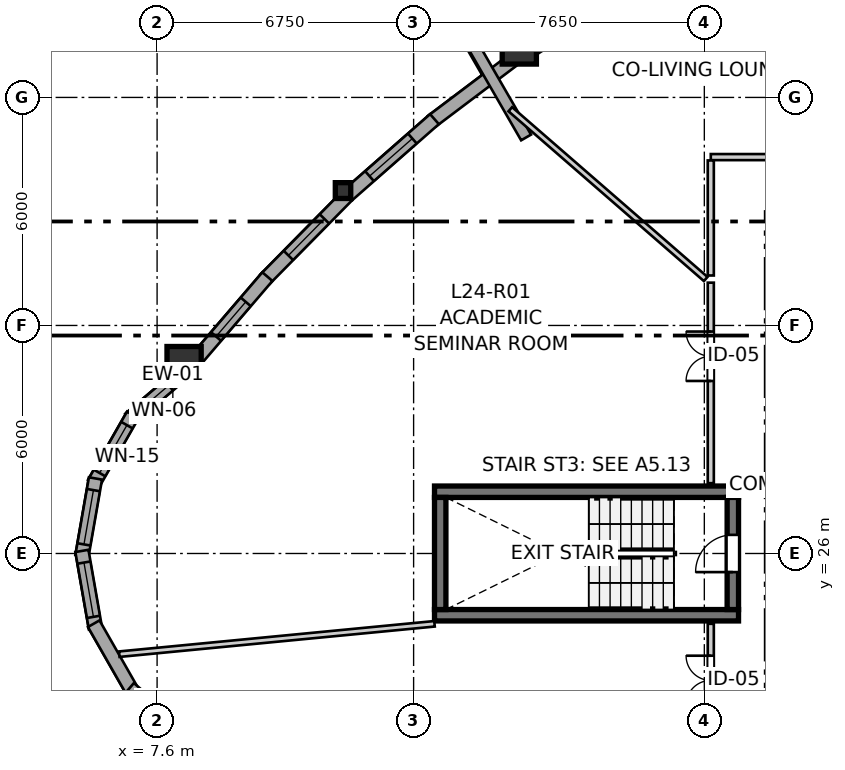
"""IFC4 building model, lengths in metres.
Left out: names, types, materials, properties, quantities, classifications, styles, units other than length and angle.
Written with IfcOpenShell. Run it as: python <this file> out.ifc"""

import sys

from ifc_helpers import new_model, si_unit, direction, frame, frame_2d, origin, origin_2d, place, context, subcontext, project, spatial, rectangle, i_section, extrude, source, transform, mapped, element, fill, save


model = new_model("IFC4")
c1 = context("Model", 3, precision=1e-05, world=origin(), true_north=direction((0.0, 1.0)))
c2 = subcontext(c1, "Body", "Model", "MODEL_VIEW")
j1 = project(units=[si_unit("LENGTHUNIT", "METRE"), si_unit("PLANEANGLEUNIT", "RADIAN")], contexts=[c1])
p1 = place(None, origin())
s1 = spatial("IfcSite", under=j1, at=p1, CompositionType="ELEMENT")
p2 = place(p1, origin())
s2 = spatial("IfcBuilding", under=s1, at=p2, CompositionType="ELEMENT")
p3 = place(p2, frame((0.0, 0.0, 83.2)))
s3 = spatial("IfcBuildingStorey", under=s2, at=p3, CompositionType="ELEMENT", Elevation=83.2)
for number, where, z_axis, x_axis in (
    (1, (14.9, 24.375, 0.0), (0.0, 0.0, 1.0), (1.0, 0.0, 0.0)),
    (2, (22.9, 27.625, 0.0), (0.0, 0.0, 1.0), (-1.0, 0.0, 0.0)),
):
    element("IfcWall", number, at=place(p3, frame(where, z_axis=z_axis, x_axis=x_axis)), inside=s3, PredefinedType="SHEAR", context=c2, shape_type="SweptSolid", body=[
        extrude(rectangle(XDim=8.0, YDim=0.3, at=frame_2d((4.0, 0.0))), origin(), (0.0, 0.0, 1.0), 2.935),
    ])
p4 = place(p3, frame((15.05, 27.475, 0.0), z_axis=(0.0, 0.0, 1.0), x_axis=(0.0, -1.0, 0.0)))
e3 = element("IfcWall", 3, at=p4, inside=s3, PredefinedType="SHEAR", context=c2, shape_type="SweptSolid", body=[
    extrude(rectangle(XDim=2.95, YDim=0.3, at=frame_2d((1.475, 0.0))), origin(), (0.0, 0.0, 1.0), 2.935),
])
p5 = place(p3, frame((22.75, 24.525, 0.0), z_axis=(0.0, 0.0, 1.0), x_axis=(0.0, 1.0, 0.0)))
e4 = element("IfcWall", 4, at=p5, inside=s3, PredefinedType="SHEAR", context=c2, shape_type="SweptSolid", body=[
    extrude(rectangle(XDim=2.95, YDim=0.3, at=frame_2d((1.475, 0.0))), origin(), (0.0, 0.0, 1.0), 2.935),
])
p6 = place(p5, frame((0.985, 0.0, 0.0)))
e5 = element("IfcOpeningElement", 5, at=p6, cuts=e4, PredefinedType="OPENING", context=c2, shape_type="SweptSolid", body=[
    extrude(rectangle(XDim=0.98, YDim=2.15, at=frame_2d((0.49, 1.075))), frame((0.0, 0.16, 0.0), z_axis=(0.0, -1.0, 0.0), x_axis=(1.0, 0.0, 0.0)), (0.0, 0.0, 1.0), 0.32),
])
m1 = source(origin(), c2, "Body", "SweptSolid", [
    extrude(rectangle(XDim=0.9, YDim=0.9, at=origin_2d()), origin(), (0.0, 0.0, 1.0), 2.935),
])
for number, where, z_axis, x_axis in (
    (6, (8.31, 30.996, 0.0), (0.0, 0.0, 1.0), (1.0, 0.0, 0.0)),
    (7, (17.131, 39.327, 0.0), (0.0, 0.0, 1.0), (1.0, 0.0, 0.0)),
):
    element("IfcColumn", number, at=place(p3, frame(where, z_axis=z_axis, x_axis=x_axis)), inside=s3, PredefinedType="COLUMN", context=c2, shape_type="MappedRepresentation", body=[
        mapped(m1, transform((0.0, 0.0, 0.0), x_axis=(1.0, 0.0, 0.0), y_axis=(0.0, 1.0, 0.0), z_axis=(0.0, 0.0, 1.0), scale=1.0)),
    ])
m2 = source(origin(), c2, "Body", "SweptSolid", [
    extrude(i_section(OverallWidth=0.406, OverallDepth=0.416, WebThickness=0.027, FlangeThickness=0.044, FilletRadius=0.015, at=origin_2d()), origin(), (0.0, 0.0, 1.0), 2.935),
])
p7 = place(p3, frame((12.493, 35.549, 0.0), z_axis=(0.0, 0.0, 1.0), x_axis=(1.0, 0.0, 0.0)))
e8 = element("IfcColumn", 8, at=p7, inside=s3, PredefinedType="PILASTER", context=c2, shape_type="MappedRepresentation", body=[
    mapped(m2, transform((0.0, 0.0, 0.0), x_axis=(1.0, 0.0, 0.0), y_axis=(0.0, 1.0, 0.0), z_axis=(0.0, 0.0, 1.0), scale=1.0)),
])
p8 = place(p3, frame((8.253, 30.717, 0.0), z_axis=(0.0, 0.0, 1.0), x_axis=(-0.761176639947, -0.648544618973, 0.0)))
e9 = element("IfcWall", 9, at=p8, inside=s3, PredefinedType="SOLIDWALL", context=c2, shape_type="SweptSolid", body=[
    extrude(rectangle(XDim=1.81, YDim=0.35, at=frame_2d((0.905, 0.0))), origin(), (0.0, 0.0, 1.0), 2.465),
])
p9 = place(p8, frame((0.455, 0.0, 0.82)))
e10 = element("IfcOpeningElement", 10, at=p9, cuts=e9, PredefinedType="OPENING", context=c2, shape_type="SweptSolid", body=[
    extrude(rectangle(XDim=1.05, YDim=1.45, at=frame_2d((0.525, 0.725))), frame((0.0, 0.185, 0.0), z_axis=(0.0, -1.0, 0.0), x_axis=(1.0, 0.0, 0.0)), (0.0, 0.0, 1.0), 0.37),
])
p10 = place(p3, frame((6.961, 29.647, 0.0), z_axis=(0.0, 0.0, 1.0), x_axis=(-0.496037473582, -0.868301114132, 0.0)))
e11 = element("IfcWall", 11, at=p10, inside=s3, PredefinedType="SOLIDWALL", context=c2, shape_type="SweptSolid", body=[
    extrude(rectangle(XDim=2.073, YDim=0.35, at=frame_2d((1.037, 0.0))), origin(), (0.0, 0.0, 1.0), 2.465),
])
p11 = place(p10, frame((0.312, 0.0, 0.82)))
e12 = element("IfcOpeningElement", 12, at=p11, cuts=e11, PredefinedType="OPENING", context=c2, shape_type="SweptSolid", body=[
    extrude(rectangle(XDim=1.45, YDim=1.25, at=frame_2d((0.725, 0.625))), frame((0.0, 0.185, 0.0), z_axis=(0.0, -1.0, 0.0), x_axis=(1.0, 0.0, 0.0)), (0.0, 0.0, 1.0), 0.37),
])
p12 = place(p3, frame((5.979, 27.975, 0.0), z_axis=(0.0, 0.0, 1.0), x_axis=(-0.172166087538, -0.985067935881, 0.0)))
e13 = element("IfcWall", 13, at=p12, inside=s3, PredefinedType="SOLIDWALL", context=c2, shape_type="SweptSolid", body=[
    extrude(rectangle(XDim=2.073, YDim=0.35, at=frame_2d((1.037, 0.0))), origin(), (0.0, 0.0, 1.0), 2.465),
])
p13 = place(p12, frame((0.312, 0.0, 0.82)))
e14 = element("IfcOpeningElement", 14, at=p13, cuts=e13, PredefinedType="OPENING", context=c2, shape_type="SweptSolid", body=[
    extrude(rectangle(XDim=1.45, YDim=1.25, at=frame_2d((0.725, 0.625))), frame((0.0, 0.185, 0.0), z_axis=(0.0, -1.0, 0.0), x_axis=(1.0, 0.0, 0.0)), (0.0, 0.0, 1.0), 0.37),
])
p14 = place(p3, frame((5.622, 26.068, 0.0), z_axis=(0.0, 0.0, 1.0), x_axis=(0.172166087538, -0.985067935881, 0.0)))
e15 = element("IfcWall", 15, at=p14, inside=s3, PredefinedType="SOLIDWALL", context=c2, shape_type="SweptSolid", body=[
    extrude(rectangle(XDim=2.073, YDim=0.35, at=frame_2d((1.037, 0.0))), origin(), (0.0, 0.0, 1.0), 2.465),
])
p15 = place(p14, frame((0.312, 0.0, 0.82)))
e16 = element("IfcOpeningElement", 16, at=p15, cuts=e15, PredefinedType="OPENING", context=c2, shape_type="SweptSolid", body=[
    extrude(rectangle(XDim=1.45, YDim=1.25, at=frame_2d((0.725, 0.625))), frame((0.0, 0.185, 0.0), z_axis=(0.0, -1.0, 0.0), x_axis=(1.0, 0.0, 0.0)), (0.0, 0.0, 1.0), 0.37),
])
p16 = place(p3, frame((5.933, 24.153, 0.0), z_axis=(0.0, 0.0, 1.0), x_axis=(0.496037473582, -0.868301114132, 0.0)))
e17 = element("IfcWall", 17, at=p16, inside=s3, PredefinedType="SOLIDWALL", context=c2, shape_type="SweptSolid", body=[
    extrude(rectangle(XDim=2.073, YDim=0.35, at=frame_2d((1.037, 0.0))), origin(), (0.0, 0.0, 1.0), 2.465),
])
p17 = place(p3, frame((6.875, 22.457, 0.0), z_axis=(0.0, 0.0, 1.0), x_axis=(0.761203352049, -0.648513266502, 0.0)))
e18 = element("IfcWall", 18, at=p17, inside=s3, PredefinedType="SOLIDWALL", context=c2, shape_type="SweptSolid", body=[
    extrude(rectangle(XDim=2.015, YDim=0.35, at=frame_2d((1.007, 0.0))), origin(), (0.0, 0.0, 1.0), 2.465),
])
p18 = place(p17, frame((0.393, 0.0, 0.82)))
e19 = element("IfcOpeningElement", 19, at=p18, cuts=e18, PredefinedType="OPENING", context=c2, shape_type="SweptSolid", body=[
    extrude(rectangle(XDim=1.25, YDim=1.35, at=frame_2d((0.625, 0.675))), frame((0.0, 0.185, 0.0), z_axis=(0.0, -1.0, 0.0), x_axis=(1.0, 0.0, 0.0)), (0.0, 0.0, 1.0), 0.37),
])
p19 = place(p3, frame((17.057, 39.052, 0.0), z_axis=(0.0, 0.0, 1.0), x_axis=(-0.798379678642, -0.602154372841, 0.0)))
e20 = element("IfcWall", 20, at=p19, inside=s3, PredefinedType="SOLIDWALL", context=c2, shape_type="SweptSolid", body=[
    extrude(rectangle(XDim=2.79, YDim=0.35, at=frame_2d((1.395, 0.0))), origin(), (0.0, 0.0, 1.0), 2.465),
])
p20 = place(p3, frame((14.899, 37.429, 0.0), z_axis=(0.0, 0.0, 1.0), x_axis=(-0.751526984469, -0.659702350773, 0.0)))
e21 = element("IfcWall", 21, at=p20, inside=s3, PredefinedType="SOLIDWALL", context=c2, shape_type="SweptSolid", body=[
    extrude(rectangle(XDim=3.028, YDim=0.35, at=frame_2d((1.514, 0.0))), origin(), (0.0, 0.0, 1.0), 2.465),
])
p21 = place(p20, frame((0.774, 0.0, 0.82)))
e22 = element("IfcOpeningElement", 22, at=p21, cuts=e21, PredefinedType="OPENING", context=c2, shape_type="SweptSolid", body=[
    extrude(rectangle(XDim=1.5, YDim=1.45, at=frame_2d((0.75, 0.725))), frame((0.0, 0.185, 0.0), z_axis=(0.0, -1.0, 0.0), x_axis=(1.0, 0.0, 0.0)), (0.0, 0.0, 1.0), 0.37),
])
p22 = place(p3, frame((12.603, 35.412, 0.0), z_axis=(0.0, 0.0, 1.0), x_axis=(-0.701972782373, -0.71220377197, 0.0)))
e23 = element("IfcWall", 23, at=p22, inside=s3, PredefinedType="SOLIDWALL", context=c2, shape_type="SweptSolid", body=[
    extrude(rectangle(XDim=3.078, YDim=0.35, at=frame_2d((1.539, 0.0))), origin(), (0.0, 0.0, 1.0), 2.465),
])
p23 = place(p22, frame((0.854, 0.0, 0.82)))
e24 = element("IfcOpeningElement", 24, at=p23, cuts=e23, PredefinedType="OPENING", context=c2, shape_type="SweptSolid", body=[
    extrude(rectangle(XDim=1.35, YDim=1.45, at=frame_2d((0.675, 0.725))), frame((0.0, 0.185, 0.0), z_axis=(0.0, -1.0, 0.0), x_axis=(1.0, 0.0, 0.0)), (0.0, 0.0, 1.0), 0.37),
])
p24 = place(p3, frame((10.502, 33.285, 0.0), z_axis=(0.0, 0.0, 1.0), x_axis=(-0.650770847407, -0.75927419564, 0.0)))
e25 = element("IfcWall", 25, at=p24, inside=s3, PredefinedType="SOLIDWALL", context=c2, shape_type="SweptSolid", body=[
    extrude(rectangle(XDim=2.938, YDim=0.35, at=frame_2d((1.469, 0.0))), origin(), (0.0, 0.0, 1.0), 2.465),
])
p25 = place(p24, frame((0.874, 0.0, 0.82)))
e26 = element("IfcOpeningElement", 26, at=p25, cuts=e25, PredefinedType="OPENING", context=c2, shape_type="SweptSolid", body=[
    extrude(rectangle(XDim=1.2, YDim=1.45, at=frame_2d((0.6, 0.725))), frame((0.0, 0.185, 0.0), z_axis=(0.0, -1.0, 0.0), x_axis=(1.0, 0.0, 0.0)), (0.0, 0.0, 1.0), 0.37),
])
p26 = place(p3, frame((17.31, 36.946, 0.0), z_axis=(0.0, 0.0, 1.0), x_axis=(-0.499999403898, 0.866025747944, 0.0)))
e27 = element("IfcWall", 27, at=p26, inside=s3, PredefinedType="SOLIDWALL", context=c2, shape_type="SweptSolid", body=[
    extrude(rectangle(XDim=20.603, YDim=0.3, at=frame_2d((10.302, 0.0))), origin(), (0.0, 0.0, 1.0), 2.115),
])
p27 = place(p3, frame((22.17, 27.85, 0.0), z_axis=(0.0, 0.0, 1.0), x_axis=(0.0, 1.0, 0.0)))
e28 = element("IfcWall", 28, at=p27, inside=s3, PredefinedType="PARTITIONING", context=c2, shape_type="SweptSolid", body=[
    extrude(rectangle(XDim=5.276, YDim=0.16, at=frame_2d((2.638, 0.0))), origin(), (0.0, 0.0, 1.0), 2.935),
])
p28 = place(p27, frame((2.689, 0.0, 0.0)))
e29 = element("IfcOpeningElement", 29, at=p28, cuts=e28, PredefinedType="OPENING", context=c2, shape_type="SweptSolid", body=[
    extrude(rectangle(XDim=1.3, YDim=2.1, at=frame_2d((0.65, 1.05))), frame((0.0, 0.09, 0.0), z_axis=(0.0, -1.0, 0.0), x_axis=(1.0, 0.0, 0.0)), (0.0, 0.0, 1.0), 0.18),
])
p29 = place(p3, frame((22.17, 36.43, 0.0), z_axis=(0.0, 0.0, 1.0), x_axis=(1.0, 0.0, 0.0)))
e30 = element("IfcWall", 30, at=p29, inside=s3, PredefinedType="PARTITIONING", context=c2, shape_type="SweptSolid", body=[
    extrude(rectangle(XDim=5.122, YDim=0.16, at=frame_2d((2.561, 0.0))), origin(), (0.0, 0.0, 1.0), 2.573),
])
p30 = place(p29, frame((1.903, 0.0, 0.0)))
e31 = element("IfcOpeningElement", 31, at=p30, cuts=e30, PredefinedType="OPENING", context=c2, shape_type="SweptSolid", body=[
    extrude(rectangle(XDim=1.3, YDim=2.1, at=frame_2d((0.65, 1.05))), frame((0.0, 0.09, 0.0), z_axis=(0.0, -1.0, 0.0), x_axis=(1.0, 0.0, 0.0)), (0.0, 0.0, 1.0), 0.18),
])
p31 = place(p3, frame((22.17, 21.128, 0.0), z_axis=(0.0, 0.0, 1.0), x_axis=(0.0, 1.0, 0.0)))
e32 = element("IfcWall", 32, at=p31, inside=s3, PredefinedType="PARTITIONING", context=c2, shape_type="SweptSolid", body=[
    extrude(rectangle(XDim=3.022, YDim=0.16, at=frame_2d((1.511, 0.0))), origin(), (0.0, 0.0, 1.0), 2.935),
])
p32 = place(p31, frame((0.883, 0.0, 0.0)))
e33 = element("IfcOpeningElement", 33, at=p32, cuts=e32, PredefinedType="OPENING", context=c2, shape_type="SweptSolid", body=[
    extrude(rectangle(XDim=1.3, YDim=2.1, at=frame_2d((0.65, 1.05))), frame((0.0, 0.09, 0.0), z_axis=(0.0, -1.0, 0.0), x_axis=(1.0, 0.0, 0.0)), (0.0, 0.0, 1.0), 0.18),
])
p33 = place(p3, frame((6.605, 23.351, 0.0), z_axis=(0.0, 0.0, 1.0), x_axis=(0.995388985265, 0.09592063393, 0.0)))
e34 = element("IfcWall", 34, at=p33, inside=s3, PredefinedType="PARTITIONING", context=c2, shape_type="SweptSolid", body=[
    extrude(rectangle(XDim=8.333, YDim=0.145, at=frame_2d((4.167, 0.0))), origin(), (0.0, 0.0, 1.0), 2.935),
])
p34 = place(p3, frame((16.895, 37.69, 0.0), z_axis=(0.0, 0.0, 1.0), x_axis=(0.754854710059, -0.655892038907, 0.0)))
e35 = element("IfcWall", 35, at=p34, inside=s3, PredefinedType="PARTITIONING", context=c2, shape_type="SweptSolid", body=[
    extrude(rectangle(XDim=6.811, YDim=0.145, at=frame_2d((3.406, 0.0))), origin(), (0.0, 0.0, 1.0), 2.103),
])
p35 = place(p3, frame((22.17, 33.315, 0.0), z_axis=(0.0, 0.0, 1.0), x_axis=(0.0, 1.0, 0.0)))
e36 = element("IfcWall", 36, at=p35, inside=s3, PredefinedType="PARTITIONING", context=c2, shape_type="SweptSolid", body=[
    extrude(rectangle(XDim=3.027, YDim=0.16, at=frame_2d((1.514, 0.0))), origin(), (0.0, 0.0, 1.0), 2.935),
])
p36 = place(p3, frame((17.326, 39.048, 0.0), z_axis=(0.0, 0.0, 1.0), x_axis=(0.841527071554, 0.540214945963, 0.0)))
e37 = element("IfcWall", 37, at=p36, inside=s3, PredefinedType="PARTITIONING", context=c2, shape_type="SweptSolid", body=[
    extrude(rectangle(XDim=2.934, YDim=0.145, at=frame_2d((1.467, 0.0))), origin(), (0.0, 0.0, 1.0), 2.453),
])
m3 = source(origin(), c2, "Body", "SweptSolid", [
    extrude(rectangle(XDim=1.05, YDim=1.45, at=frame_2d((0.525, 0.725))), frame((0.0, 0.03, 0.0), z_axis=(0.0, -1.0, 0.0), x_axis=(1.0, 0.0, 0.0)), (0.0, 0.0, 1.0), 0.06),
])
p37 = place(p9, origin())
e38 = element("IfcWindow", 38, at=p37, inside=s3, PartitioningType="SINGLE_PANEL", PredefinedType="WINDOW", context=c2, shape_type="MappedRepresentation", body=[
    mapped(m3, transform((0.0, 0.0, 0.0), x_axis=(1.0, 0.0, 0.0), y_axis=(0.0, 1.0, 0.0), z_axis=(0.0, 0.0, 1.0), scale=1.0)),
])
fill(e10, e38)
m4 = source(origin(), c2, "Body", "SweptSolid", [
    extrude(rectangle(XDim=1.45, YDim=1.25, at=frame_2d((0.725, 0.625))), frame((0.0, 0.03, 0.0), z_axis=(0.0, -1.0, 0.0), x_axis=(1.0, 0.0, 0.0)), (0.0, 0.0, 1.0), 0.06),
])
p38 = place(p11, origin())
e39 = element("IfcWindow", 39, at=p38, inside=s3, PartitioningType="SINGLE_PANEL", PredefinedType="WINDOW", context=c2, shape_type="MappedRepresentation", body=[
    mapped(m4, transform((0.0, 0.0, 0.0), x_axis=(1.0, 0.0, 0.0), y_axis=(0.0, 1.0, 0.0), z_axis=(0.0, 0.0, 1.0), scale=1.0)),
])
fill(e12, e39)
p39 = place(p13, origin())
e40 = element("IfcWindow", 40, at=p39, inside=s3, PartitioningType="SINGLE_PANEL", PredefinedType="WINDOW", context=c2, shape_type="MappedRepresentation", body=[
    mapped(m4, transform((0.0, 0.0, 0.0), x_axis=(1.0, 0.0, 0.0), y_axis=(0.0, 1.0, 0.0), z_axis=(0.0, 0.0, 1.0), scale=1.0)),
])
fill(e14, e40)
p40 = place(p15, origin())
e41 = element("IfcWindow", 41, at=p40, inside=s3, PartitioningType="SINGLE_PANEL", PredefinedType="WINDOW", context=c2, shape_type="MappedRepresentation", body=[
    mapped(m4, transform((0.0, 0.0, 0.0), x_axis=(1.0, 0.0, 0.0), y_axis=(0.0, 1.0, 0.0), z_axis=(0.0, 0.0, 1.0), scale=1.0)),
])
fill(e16, e41)
m5 = source(origin(), c2, "Body", "SweptSolid", [
    extrude(rectangle(XDim=1.5, YDim=1.45, at=frame_2d((0.75, 0.725))), frame((0.0, 0.03, 0.0), z_axis=(0.0, -1.0, 0.0), x_axis=(1.0, 0.0, 0.0)), (0.0, 0.0, 1.0), 0.06),
])
p41 = place(p21, origin())
e42 = element("IfcWindow", 42, at=p41, inside=s3, PartitioningType="SINGLE_PANEL", PredefinedType="WINDOW", context=c2, shape_type="MappedRepresentation", body=[
    mapped(m5, transform((0.0, 0.0, 0.0), x_axis=(1.0, 0.0, 0.0), y_axis=(0.0, 1.0, 0.0), z_axis=(0.0, 0.0, 1.0), scale=1.0)),
])
fill(e22, e42)
m6 = source(origin(), c2, "Body", "SweptSolid", [
    extrude(rectangle(XDim=1.35, YDim=1.45, at=frame_2d((0.675, 0.725))), frame((0.0, 0.03, 0.0), z_axis=(0.0, -1.0, 0.0), x_axis=(1.0, 0.0, 0.0)), (0.0, 0.0, 1.0), 0.06),
])
p42 = place(p23, origin())
e43 = element("IfcWindow", 43, at=p42, inside=s3, PartitioningType="SINGLE_PANEL", PredefinedType="WINDOW", context=c2, shape_type="MappedRepresentation", body=[
    mapped(m6, transform((0.0, 0.0, 0.0), x_axis=(1.0, 0.0, 0.0), y_axis=(0.0, 1.0, 0.0), z_axis=(0.0, 0.0, 1.0), scale=1.0)),
])
fill(e24, e43)
m7 = source(origin(), c2, "Body", "SweptSolid", [
    extrude(rectangle(XDim=1.2, YDim=1.45, at=frame_2d((0.6, 0.725))), frame((0.0, 0.03, 0.0), z_axis=(0.0, -1.0, 0.0), x_axis=(1.0, 0.0, 0.0)), (0.0, 0.0, 1.0), 0.06),
])
p43 = place(p25, origin())
e44 = element("IfcWindow", 44, at=p43, inside=s3, PartitioningType="SINGLE_PANEL", PredefinedType="WINDOW", context=c2, shape_type="MappedRepresentation", body=[
    mapped(m7, transform((0.0, 0.0, 0.0), x_axis=(1.0, 0.0, 0.0), y_axis=(0.0, 1.0, 0.0), z_axis=(0.0, 0.0, 1.0), scale=1.0)),
])
fill(e26, e44)
m8 = source(origin(), c2, "Body", "SweptSolid", [
    extrude(rectangle(XDim=0.98, YDim=2.15, at=frame_2d((0.49, 1.075))), frame((0.0, 0.025, 0.0), z_axis=(0.0, -1.0, 0.0), x_axis=(1.0, 0.0, 0.0)), (0.0, 0.0, 1.0), 0.05),
])
p44 = place(p6, origin())
e45 = element("IfcDoor", 45, at=p44, inside=s3, OperationType="SINGLE_SWING_LEFT", PredefinedType="DOOR", context=c2, shape_type="MappedRepresentation", body=[
    mapped(m8, transform((0.0, 0.0, 0.0), x_axis=(1.0, 0.0, 0.0), y_axis=(0.0, 1.0, 0.0), z_axis=(0.0, 0.0, 1.0), scale=1.0)),
])
fill(e5, e45)
m9 = source(origin(), c2, "Body", "SweptSolid", [
    extrude(rectangle(XDim=1.3, YDim=2.1, at=frame_2d((0.65, 1.05))), frame((0.0, 0.025, 0.0), z_axis=(0.0, -1.0, 0.0), x_axis=(1.0, 0.0, 0.0)), (0.0, 0.0, 1.0), 0.05),
])
p45 = place(p28, origin())
e46 = element("IfcDoor", 46, at=p45, inside=s3, OperationType="DOUBLE_DOOR_SINGLE_SWING", PredefinedType="DOOR", context=c2, shape_type="MappedRepresentation", body=[
    mapped(m9, transform((0.0, 0.0, 0.0), x_axis=(1.0, 0.0, 0.0), y_axis=(0.0, 1.0, 0.0), z_axis=(0.0, 0.0, 1.0), scale=1.0)),
])
fill(e29, e46)
p46 = place(p32, origin())
e47 = element("IfcDoor", 47, at=p46, inside=s3, OperationType="DOUBLE_DOOR_SINGLE_SWING", PredefinedType="DOOR", context=c2, shape_type="MappedRepresentation", body=[
    mapped(m9, transform((0.0, 0.0, 0.0), x_axis=(1.0, 0.0, 0.0), y_axis=(0.0, 1.0, 0.0), z_axis=(0.0, 0.0, 1.0), scale=1.0)),
])
fill(e33, e47)
save(model, sys.argv[1])
